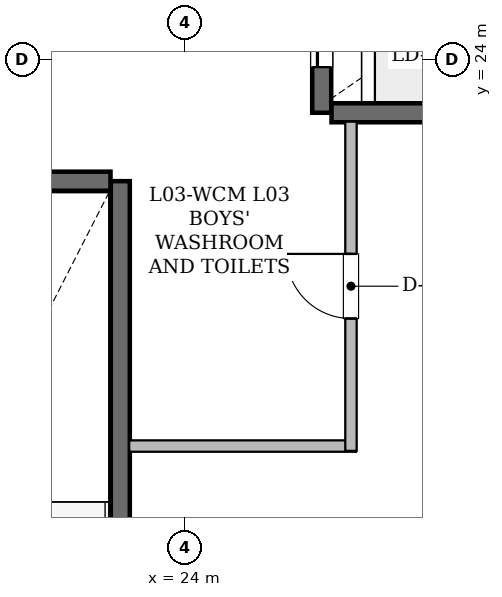
"""IFC4 building model, lengths in metres.
Left out: names, types, materials, properties, quantities, classifications, styles, units other than length and angle.
Written with IfcOpenShell. Run it as: python <this file> out.ifc"""

import sys

from ifc_helpers import new_model, si_unit, direction, frame, frame_2d, origin, place, context, subcontext, project, spatial, rectangle, extrude, element, fill, save


model = new_model("IFC4")
c1 = context("Model", 3, precision=1e-05, world=origin(), true_north=direction((0.0, 1.0)))
c2 = subcontext(c1, "Body", "Model", "MODEL_VIEW")
j1 = project(units=[si_unit("LENGTHUNIT", "METRE"), si_unit("PLANEANGLEUNIT", "RADIAN")], contexts=[c1])
p1 = place(None, origin())
s1 = spatial("IfcSite", under=j1, at=p1, CompositionType="ELEMENT")
p2 = place(p1, origin())
s2 = spatial("IfcBuilding", under=s1, at=p2, CompositionType="ELEMENT")
p3 = place(p2, frame((0.0, 0.0, 16.2)))
s3 = spatial("IfcBuildingStorey", under=s2, at=p3, CompositionType="ELEMENT", Elevation=16.2)
p4 = place(p3, frame((23.15, 13.2, 0.0), z_axis=(0.0, 0.0, 1.0), x_axis=(0.0, 1.0, 0.0)))
e1 = element("IfcWall", 1, at=p4, inside=s3, PredefinedType="SHEAR", context=c2, shape_type="SweptSolid", body=[
    extrude(rectangle(XDim=9.2, YDim=0.25, at=frame_2d((4.6, 0.0))), origin(), (0.0, 0.0, 1.0), 3.92),
])
p5 = place(p4, frame((0.4, 0.0, 0.0)))
e2 = element("IfcOpeningElement", 2, at=p5, cuts=e1, PredefinedType="OPENING", context=c2, shape_type="SweptSolid", body=[
    extrude(rectangle(XDim=1.0, YDim=2.15, at=frame_2d((0.5, 1.075))), frame((0.0, 0.135, 0.0), z_axis=(0.0, -1.0, 0.0), x_axis=(1.0, 0.0, 0.0)), (0.0, 0.0, 1.0), 0.27),
])
p6 = place(p3, frame((19.329, 22.4, 0.0), z_axis=(0.0, 0.0, 1.0), x_axis=(1.0, 0.0, 0.0)))
e3 = element("IfcWall", 3, at=p6, inside=s3, PredefinedType="SHEAR", context=c2, shape_type="SweptSolid", body=[
    extrude(rectangle(XDim=3.692, YDim=0.25, at=frame_2d((1.846, 0.0))), origin(), (0.0, 0.0, 1.0), 3.92),
])
p7 = place(p3, frame((25.8, 23.3, 0.0), z_axis=(0.0, 0.0, 1.0), x_axis=(0.0, 1.0, 0.0)))
e4 = element("IfcWall", 4, at=p7, inside=s3, PredefinedType="SHEAR", context=c2, shape_type="SweptSolid", body=[
    extrude(rectangle(XDim=4.55, YDim=0.25, at=frame_2d((2.275, 0.0))), origin(), (0.0, 0.0, 1.0), 3.92),
])
p8 = place(p7, frame((0.6, 0.0, 0.0)))
e5 = element("IfcOpeningElement", 5, at=p8, cuts=e4, PredefinedType="OPENING", context=c2, shape_type="SweptSolid", body=[
    extrude(rectangle(XDim=1.1, YDim=2.15, at=frame_2d((0.55, 1.075))), frame((0.0, 0.135, 0.0), z_axis=(0.0, -1.0, 0.0), x_axis=(1.0, 0.0, 0.0)), (0.0, 0.0, 1.0), 0.27),
])
p9 = place(p7, frame((2.85, 0.0, 0.0)))
e6 = element("IfcOpeningElement", 6, at=p9, cuts=e4, PredefinedType="OPENING", context=c2, shape_type="SweptSolid", body=[
    extrude(rectangle(XDim=1.1, YDim=2.15, at=frame_2d((0.55, 1.075))), frame((0.0, 0.135, 0.0), z_axis=(0.0, -1.0, 0.0), x_axis=(1.0, 0.0, 0.0)), (0.0, 0.0, 1.0), 0.27),
])
p10 = place(p3, frame((25.929, 23.3, 0.0), z_axis=(0.0, 0.0, 1.0), x_axis=(1.0, 0.0, 0.0)))
e7 = element("IfcWall", 7, at=p10, inside=s3, PredefinedType="SHEAR", context=c2, shape_type="SweptSolid", body=[
    extrude(rectangle(XDim=2.917, YDim=0.25, at=frame_2d((1.458, 0.0))), origin(), (0.0, 0.0, 1.0), 3.92),
])
p11 = place(p3, frame((23.267, 18.915, 0.0), z_axis=(0.0, 0.0, 1.0), x_axis=(1.0, 0.0, 0.0)))
e8 = element("IfcWall", 8, at=p11, inside=s3, PredefinedType="STANDARD", context=c2, shape_type="SweptSolid", body=[
    extrude(rectangle(XDim=2.983, YDim=0.15, at=frame_2d((1.491, 0.0))), origin(), (0.0, 0.0, 1.0), 3.92),
])
p12 = place(p3, frame((26.185, 18.852, 0.0), z_axis=(0.0, 0.0, 1.0), x_axis=(0.0, 1.0, 0.0)))
e9 = element("IfcWall", 9, at=p12, inside=s3, PredefinedType="STANDARD", context=c2, shape_type="SweptSolid", body=[
    extrude(rectangle(XDim=4.331, YDim=0.15, at=frame_2d((2.166, 0.0))), origin(), (0.0, 0.0, 1.0), 3.92),
])
p13 = place(p12, frame((1.741, 0.0, 0.0)))
e10 = element("IfcOpeningElement", 10, at=p13, cuts=e9, PredefinedType="OPENING", context=c2, shape_type="SweptSolid", body=[
    extrude(rectangle(XDim=0.85, YDim=2.1, at=frame_2d((0.425, 1.05))), frame((0.0, 0.085, 0.0), z_axis=(0.0, -1.0, 0.0), x_axis=(1.0, 0.0, 0.0)), (0.0, 0.0, 1.0), 0.17),
])
p14 = place(p8, origin())
e11 = element("IfcDoor", 11, at=p14, inside=s3, OperationType="SLIDING_TO_LEFT", PredefinedType="DOOR", context=c2, shape_type="SweptSolid", body=[
    extrude(rectangle(XDim=1.1, YDim=2.15, at=frame_2d((0.55, 1.075))), frame((0.0, 0.025, 0.0), z_axis=(0.0, -1.0, 0.0), x_axis=(1.0, 0.0, 0.0)), (0.0, 0.0, 1.0), 0.05),
])
fill(e5, e11)
p15 = place(p13, origin())
e12 = element("IfcDoor", 12, at=p15, inside=s3, OperationType="SINGLE_SWING_RIGHT", PredefinedType="DOOR", context=c2, shape_type="SweptSolid", body=[
    extrude(rectangle(XDim=0.85, YDim=2.1, at=frame_2d((0.425, 1.05))), frame((0.0, 0.025, 0.0), z_axis=(0.0, -1.0, 0.0), x_axis=(1.0, 0.0, 0.0)), (0.0, 0.0, 1.0), 0.05),
])
fill(e10, e12)
save(model, sys.argv[1])
